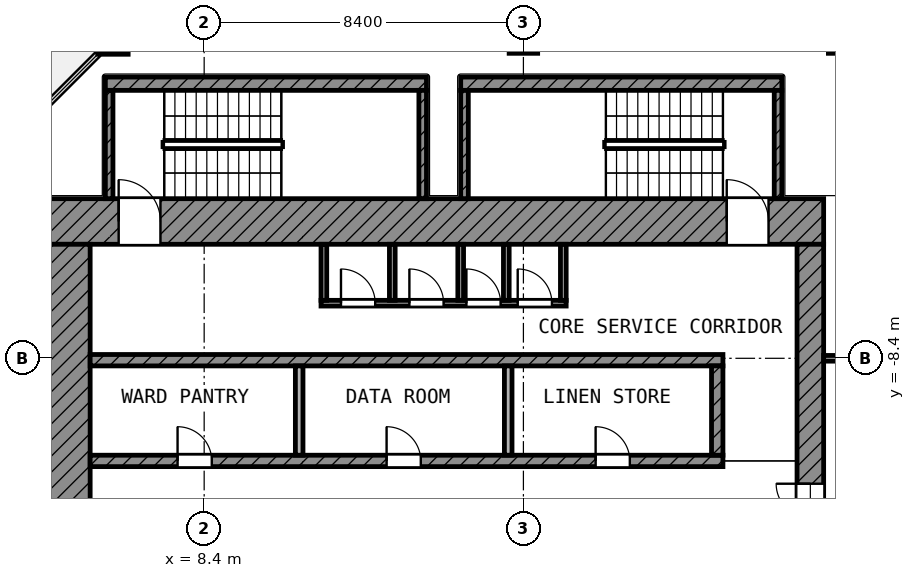
"""IFC4 building model, lengths in metres.
Left out: names, types, materials, properties, quantities, classifications, styles, units other than length and angle.
Written with IfcOpenShell. Run it as: python <this file> out.ifc"""

import sys

from ifc_helpers import new_model, si_unit, direction, frame, frame_2d, origin, origin_2d, place, context, subcontext, project, spatial, rectangle, extrude, element, fill, save


model = new_model("IFC4")
c1 = context("Model", 3, precision=1e-05, world=origin(), true_north=direction((0.0, 1.0)))
c2 = subcontext(c1, "Body", "Model", "MODEL_VIEW")
j1 = project(units=[si_unit("LENGTHUNIT", "METRE"), si_unit("PLANEANGLEUNIT", "RADIAN")], contexts=[c1])
p1 = place(None, origin())
s1 = spatial("IfcSite", under=j1, at=p1, CompositionType="ELEMENT")
p2 = place(p1, origin())
s2 = spatial("IfcBuilding", under=s1, at=p2, CompositionType="ELEMENT")
p3 = place(p2, frame((0.0, 0.0, 328.0)))
s3 = spatial("IfcBuildingStorey", under=s2, at=p3, CompositionType="ELEMENT", Elevation=328.0)
p4 = place(p3, frame((6.0, 0.0, 0.0), z_axis=(0.0, 0.0, 1.0), x_axis=(1.0, 0.0, 0.0)))
e1 = element("IfcColumn", 1, at=p4, inside=s3, PredefinedType="COLUMN", context=c2, shape_type="SweptSolid", body=[
    extrude(rectangle(XDim=0.8, YDim=0.8, at=origin_2d()), origin(), (0.0, 0.0, 1.0), 4.2),
])
for number, where, z_axis, x_axis in (
    (2, (16.8, 0.0, 0.0), (0.0, 0.0, 1.0), (1.0, 0.0, 0.0)),
    (3, (25.2, 0.0, 0.0), (0.0, 0.0, 1.0), (1.0, 0.0, 0.0)),
):
    element("IfcColumn", number, at=place(p3, frame(where, z_axis=z_axis, x_axis=x_axis)), inside=s3, PredefinedType="COLUMN", context=c2, shape_type="SweptSolid", body=[
        extrude(rectangle(XDim=0.75, YDim=0.75, at=origin_2d()), origin(), (0.0, 0.0, 1.0), 4.2),
    ])
p5 = place(p3, frame((4.2, -4.8, 0.0), z_axis=(0.0, 0.0, 1.0), x_axis=(1.0, 0.0, 0.0)))
e4 = element("IfcWall", 4, at=p5, inside=s3, PredefinedType="SHEAR", context=c2, shape_type="SweptSolid", body=[
    extrude(rectangle(XDim=20.5, YDim=1.2, at=frame_2d((10.25, 0.0))), origin(), (0.0, 0.0, 1.0), 3.78),
])
p6 = place(p5, frame((1.95, 0.0, 0.0)))
e5 = element("IfcOpeningElement", 5, at=p6, cuts=e4, PredefinedType="OPENING", context=c2, shape_type="SweptSolid", body=[
    extrude(rectangle(XDim=1.1, YDim=2.1, at=frame_2d((0.55, 1.05))), frame((0.0, 0.61, 0.0), z_axis=(0.0, -1.0, 0.0), x_axis=(1.0, 0.0, 0.0)), (0.0, 0.0, 1.0), 1.22),
])
p7 = place(p5, frame((17.95, 0.0, 0.0)))
e6 = element("IfcOpeningElement", 6, at=p7, cuts=e4, PredefinedType="OPENING", context=c2, shape_type="SweptSolid", body=[
    extrude(rectangle(XDim=1.1, YDim=2.1, at=frame_2d((0.55, 1.05))), frame((0.0, 0.61, 0.0), z_axis=(0.0, -1.0, 0.0), x_axis=(1.0, 0.0, 0.0)), (0.0, 0.0, 1.0), 1.22),
])
p8 = place(p3, frame((4.8, -24.7, 0.0), z_axis=(0.0, 0.0, 1.0), x_axis=(0.0, 1.0, 0.0)))
e7 = element("IfcWall", 7, at=p8, inside=s3, PredefinedType="SHEAR", context=c2, shape_type="SweptSolid", body=[
    extrude(rectangle(XDim=19.3, YDim=1.2, at=frame_2d((9.65, 0.0))), origin(), (0.0, 0.0, 1.0), 3.78),
])
p9 = place(p8, frame((11.15, 0.0, 0.0)))
e8 = element("IfcOpeningElement", 8, at=p9, cuts=e7, PredefinedType="OPENING", context=c2, shape_type="SweptSolid", body=[
    extrude(rectangle(XDim=1.1, YDim=2.1, at=frame_2d((0.55, 1.05))), frame((0.0, 0.61, 0.0), z_axis=(0.0, -1.0, 0.0), x_axis=(1.0, 0.0, 0.0)), (0.0, 0.0, 1.0), 1.22),
])
p10 = place(p8, frame((1.85, 0.0, 0.0)))
e9 = element("IfcOpeningElement", 9, at=p10, cuts=e7, PredefinedType="OPENING", context=c2, shape_type="SweptSolid", body=[
    extrude(rectangle(XDim=1.1, YDim=2.1, at=frame_2d((0.55, 1.05))), frame((0.0, 0.61, 0.0), z_axis=(0.0, -1.0, 0.0), x_axis=(1.0, 0.0, 0.0)), (0.0, 0.0, 1.0), 1.22),
])
p11 = place(p3, frame((24.35, -24.0, 0.0), z_axis=(0.0, 0.0, 1.0), x_axis=(0.0, 1.0, 0.0)))
e10 = element("IfcWall", 10, at=p11, inside=s3, PredefinedType="SHEAR", context=c2, shape_type="SweptSolid", body=[
    extrude(rectangle(XDim=18.6, YDim=0.7, at=frame_2d((9.3, 0.0))), origin(), (0.0, 0.0, 1.0), 3.78),
])
p12 = place(p11, frame((10.5, 0.0, 0.0)))
e11 = element("IfcOpeningElement", 11, at=p12, cuts=e10, PredefinedType="OPENING", context=c2, shape_type="SweptSolid", body=[
    extrude(rectangle(XDim=1.8, YDim=2.1, at=frame_2d((0.9, 1.05))), frame((0.0, 0.36, 0.0), z_axis=(0.0, -1.0, 0.0), x_axis=(1.0, 0.0, 0.0)), (0.0, 0.0, 1.0), 0.72),
])
p13 = place(p3, frame((5.4, -8.45, 0.0), z_axis=(0.0, 0.0, 1.0), x_axis=(1.0, 0.0, 0.0)))
e12 = element("IfcWall", 12, at=p13, inside=s3, PredefinedType="SHEAR", context=c2, shape_type="SweptSolid", body=[
    extrude(rectangle(XDim=16.65, YDim=0.3, at=frame_2d((8.325, 0.0))), origin(), (0.0, 0.0, 1.0), 3.78),
])
p14 = place(p3, frame((5.4, -11.1, 0.0), z_axis=(0.0, 0.0, 1.0), x_axis=(1.0, 0.0, 0.0)))
e13 = element("IfcWall", 13, at=p14, inside=s3, PredefinedType="SHEAR", context=c2, shape_type="SweptSolid", body=[
    extrude(rectangle(XDim=16.65, YDim=0.3, at=frame_2d((8.325, 0.0))), origin(), (0.0, 0.0, 1.0), 3.78),
])
p15 = place(p14, frame((2.3, 0.0, 0.0)))
e14 = element("IfcOpeningElement", 14, at=p15, cuts=e13, PredefinedType="OPENING", context=c2, shape_type="SweptSolid", body=[
    extrude(rectangle(XDim=0.9, YDim=2.1, at=frame_2d((0.45, 1.05))), frame((0.0, 0.16, 0.0), z_axis=(0.0, -1.0, 0.0), x_axis=(1.0, 0.0, 0.0)), (0.0, 0.0, 1.0), 0.32),
])
p16 = place(p14, frame((7.8, 0.0, 0.0)))
e15 = element("IfcOpeningElement", 15, at=p16, cuts=e13, PredefinedType="OPENING", context=c2, shape_type="SweptSolid", body=[
    extrude(rectangle(XDim=0.9, YDim=2.1, at=frame_2d((0.45, 1.05))), frame((0.0, 0.16, 0.0), z_axis=(0.0, -1.0, 0.0), x_axis=(1.0, 0.0, 0.0)), (0.0, 0.0, 1.0), 0.32),
])
p17 = place(p14, frame((13.3, 0.0, 0.0)))
e16 = element("IfcOpeningElement", 16, at=p17, cuts=e13, PredefinedType="OPENING", context=c2, shape_type="SweptSolid", body=[
    extrude(rectangle(XDim=0.9, YDim=2.1, at=frame_2d((0.45, 1.05))), frame((0.0, 0.16, 0.0), z_axis=(0.0, -1.0, 0.0), x_axis=(1.0, 0.0, 0.0)), (0.0, 0.0, 1.0), 0.32),
])
p18 = place(p3, frame((21.9, -10.95, 0.0), z_axis=(0.0, 0.0, 1.0), x_axis=(0.0, 1.0, 0.0)))
e17 = element("IfcWall", 17, at=p18, inside=s3, PredefinedType="SHEAR", context=c2, shape_type="SweptSolid", body=[
    extrude(rectangle(XDim=2.35, YDim=0.3, at=frame_2d((1.175, 0.0))), origin(), (0.0, 0.0, 1.0), 3.78),
])
for number, where, z_axis, x_axis in (
    (18, (10.9, -10.95, 0.0), (0.0, 0.0, 1.0), (0.0, 1.0, 0.0)),
    (19, (16.4, -10.95, 0.0), (0.0, 0.0, 1.0), (0.0, 1.0, 0.0)),
):
    element("IfcWall", number, at=place(p3, frame(where, z_axis=z_axis, x_axis=x_axis)), inside=s3, PredefinedType="PARTITIONING", context=c2, shape_type="SweptSolid", body=[
        extrude(rectangle(XDim=2.35, YDim=0.2, at=frame_2d((1.175, 0.0))), origin(), (0.0, 0.0, 1.0), 3.78),
    ])
p19 = place(p3, frame((11.475, -6.95, 0.0), z_axis=(0.0, 0.0, 1.0), x_axis=(1.0, 0.0, 0.0)))
e20 = element("IfcWall", 20, at=p19, inside=s3, PredefinedType="PARTITIONING", context=c2, shape_type="SweptSolid", body=[
    extrude(rectangle(XDim=6.45, YDim=0.15, at=frame_2d((3.225, 0.0))), origin(), (0.0, 0.0, 1.0), 3.78),
])
p20 = place(p19, frame((0.525, 0.0, 0.0)))
e21 = element("IfcOpeningElement", 21, at=p20, cuts=e20, PredefinedType="OPENING", context=c2, shape_type="SweptSolid", body=[
    extrude(rectangle(XDim=0.9, YDim=2.1, at=frame_2d((0.45, 1.05))), frame((0.0, 0.085, 0.0), z_axis=(0.0, -1.0, 0.0), x_axis=(1.0, 0.0, 0.0)), (0.0, 0.0, 1.0), 0.17),
])
p21 = place(p19, frame((2.325, 0.0, 0.0)))
e22 = element("IfcOpeningElement", 22, at=p21, cuts=e20, PredefinedType="OPENING", context=c2, shape_type="SweptSolid", body=[
    extrude(rectangle(XDim=0.9, YDim=2.1, at=frame_2d((0.45, 1.05))), frame((0.0, 0.085, 0.0), z_axis=(0.0, -1.0, 0.0), x_axis=(1.0, 0.0, 0.0)), (0.0, 0.0, 1.0), 0.17),
])
p22 = place(p19, frame((3.825, 0.0, 0.0)))
e23 = element("IfcOpeningElement", 23, at=p22, cuts=e20, PredefinedType="OPENING", context=c2, shape_type="SweptSolid", body=[
    extrude(rectangle(XDim=0.9, YDim=2.1, at=frame_2d((0.45, 1.05))), frame((0.0, 0.085, 0.0), z_axis=(0.0, -1.0, 0.0), x_axis=(1.0, 0.0, 0.0)), (0.0, 0.0, 1.0), 0.17),
])
p23 = place(p19, frame((5.175, 0.0, 0.0)))
e24 = element("IfcOpeningElement", 24, at=p23, cuts=e20, PredefinedType="OPENING", context=c2, shape_type="SweptSolid", body=[
    extrude(rectangle(XDim=0.9, YDim=2.1, at=frame_2d((0.45, 1.05))), frame((0.0, 0.085, 0.0), z_axis=(0.0, -1.0, 0.0), x_axis=(1.0, 0.0, 0.0)), (0.0, 0.0, 1.0), 0.17),
])
for number, where, z_axis, x_axis in (
    (25, (11.55, -6.875, 0.0), (0.0, 0.0, 1.0), (0.0, 1.0, 0.0)),
    (26, (13.35, -6.875, 0.0), (0.0, 0.0, 1.0), (0.0, 1.0, 0.0)),
    (27, (15.15, -6.875, 0.0), (0.0, 0.0, 1.0), (0.0, 1.0, 0.0)),
    (28, (16.35, -6.875, 0.0), (0.0, 0.0, 1.0), (0.0, 1.0, 0.0)),
    (29, (17.85, -6.875, 0.0), (0.0, 0.0, 1.0), (0.0, 1.0, 0.0)),
):
    element("IfcWall", number, at=place(p3, frame(where, z_axis=z_axis, x_axis=x_axis)), inside=s3, PredefinedType="PARTITIONING", context=c2, shape_type="SweptSolid", body=[
        extrude(rectangle(XDim=1.475, YDim=0.15, at=frame_2d((0.738, 0.0))), origin(), (0.0, 0.0, 1.0), 3.78),
    ])
p24 = place(p3, frame((5.8, -1.175, 0.0), z_axis=(0.0, 0.0, 1.0), x_axis=(1.0, 0.0, 0.0)))
e30 = element("IfcWall", 30, at=p24, inside=s3, PredefinedType="SHEAR", context=c2, shape_type="SweptSolid", body=[
    extrude(rectangle(XDim=8.45, YDim=0.35, at=frame_2d((4.225, 0.0))), origin(), (0.0, 0.0, 1.0), 3.78),
])
for number, where, z_axis, x_axis in (
    (31, (5.9, -4.2, 0.0), (0.0, 0.0, 1.0), (0.0, 1.0, 0.0)),
    (32, (14.15, -4.2, 0.0), (0.0, 0.0, 1.0), (0.0, 1.0, 0.0)),
):
    element("IfcWall", number, at=place(p3, frame(where, z_axis=z_axis, x_axis=x_axis)), inside=s3, PredefinedType="SHEAR", context=c2, shape_type="SweptSolid", body=[
        extrude(rectangle(XDim=2.85, YDim=0.2, at=frame_2d((1.425, 0.0))), origin(), (0.0, 0.0, 1.0), 3.78),
    ])
p25 = place(p3, frame((15.15, -1.175, 0.0), z_axis=(0.0, 0.0, 1.0), x_axis=(1.0, 0.0, 0.0)))
e33 = element("IfcWall", 33, at=p25, inside=s3, PredefinedType="SHEAR", context=c2, shape_type="SweptSolid", body=[
    extrude(rectangle(XDim=8.45, YDim=0.35, at=frame_2d((4.225, 0.0))), origin(), (0.0, 0.0, 1.0), 3.78),
])
for number, where, z_axis, x_axis in (
    (34, (15.25, -4.2, 0.0), (0.0, 0.0, 1.0), (0.0, 1.0, 0.0)),
    (35, (23.5, -4.2, 0.0), (0.0, 0.0, 1.0), (0.0, 1.0, 0.0)),
):
    element("IfcWall", number, at=place(p3, frame(where, z_axis=z_axis, x_axis=x_axis)), inside=s3, PredefinedType="SHEAR", context=c2, shape_type="SweptSolid", body=[
        extrude(rectangle(XDim=2.85, YDim=0.2, at=frame_2d((1.425, 0.0))), origin(), (0.0, 0.0, 1.0), 3.78),
    ])
p26 = place(p3, frame((24.7, -8.4, 0.0), z_axis=(0.0, 0.0, 1.0), x_axis=(1.0, 0.0, 0.0)))
e36 = element("IfcWall", 36, at=p26, inside=s3, PredefinedType="PARTITIONING", context=c2, shape_type="SweptSolid", body=[
    extrude(rectangle(XDim=15.582, YDim=0.15, at=frame_2d((7.791, 0.0))), origin(), (0.0, 0.0, 1.0), 3.78),
])
p27 = place(p26, frame((1.85, 0.0, 0.0)))
e37 = element("IfcOpeningElement", 37, at=p27, cuts=e36, PredefinedType="OPENING", context=c2, shape_type="SweptSolid", body=[
    extrude(rectangle(XDim=1.2, YDim=2.1, at=frame_2d((0.6, 1.05))), frame((0.0, 0.085, 0.0), z_axis=(0.0, -1.0, 0.0), x_axis=(1.0, 0.0, 0.0)), (0.0, 0.0, 1.0), 0.17),
])
p28 = place(p26, frame((6.7, 0.0, 0.0)))
e38 = element("IfcOpeningElement", 38, at=p28, cuts=e36, PredefinedType="OPENING", context=c2, shape_type="SweptSolid", body=[
    extrude(rectangle(XDim=1.2, YDim=2.1, at=frame_2d((0.6, 1.05))), frame((0.0, 0.085, 0.0), z_axis=(0.0, -1.0, 0.0), x_axis=(1.0, 0.0, 0.0)), (0.0, 0.0, 1.0), 0.17),
])
p29 = place(p26, frame((9.4, 0.0, 0.0)))
e39 = element("IfcOpeningElement", 39, at=p29, cuts=e36, PredefinedType="OPENING", context=c2, shape_type="SweptSolid", body=[
    extrude(rectangle(XDim=1.2, YDim=2.1, at=frame_2d((0.6, 1.05))), frame((0.0, 0.085, 0.0), z_axis=(0.0, -1.0, 0.0), x_axis=(1.0, 0.0, 0.0)), (0.0, 0.0, 1.0), 0.17),
])
p30 = place(p6, origin())
e40 = element("IfcDoor", 40, at=p30, inside=s3, OperationType="SINGLE_SWING_LEFT", PredefinedType="DOOR", context=c2, shape_type="SweptSolid", body=[
    extrude(rectangle(XDim=1.1, YDim=2.1, at=frame_2d((0.55, 1.05))), frame((0.0, 0.025, 0.0), z_axis=(0.0, -1.0, 0.0), x_axis=(1.0, 0.0, 0.0)), (0.0, 0.0, 1.0), 0.05),
])
fill(e5, e40)
p31 = place(p7, origin())
e41 = element("IfcDoor", 41, at=p31, inside=s3, OperationType="SINGLE_SWING_LEFT", PredefinedType="DOOR", context=c2, shape_type="SweptSolid", body=[
    extrude(rectangle(XDim=1.1, YDim=2.1, at=frame_2d((0.55, 1.05))), frame((0.0, 0.025, 0.0), z_axis=(0.0, -1.0, 0.0), x_axis=(1.0, 0.0, 0.0)), (0.0, 0.0, 1.0), 0.05),
])
fill(e6, e41)
p32 = place(p12, origin())
e42 = element("IfcDoor", 42, at=p32, inside=s3, OperationType="DOUBLE_DOOR_SINGLE_SWING", PredefinedType="DOOR", context=c2, shape_type="SweptSolid", body=[
    extrude(rectangle(XDim=1.8, YDim=2.1, at=frame_2d((0.9, 1.05))), frame((0.0, 0.025, 0.0), z_axis=(0.0, -1.0, 0.0), x_axis=(1.0, 0.0, 0.0)), (0.0, 0.0, 1.0), 0.05),
])
fill(e11, e42)
p33 = place(p20, origin())
e43 = element("IfcDoor", 43, at=p33, inside=s3, OperationType="SINGLE_SWING_LEFT", PredefinedType="DOOR", context=c2, shape_type="SweptSolid", body=[
    extrude(rectangle(XDim=0.9, YDim=2.1, at=frame_2d((0.45, 1.05))), frame((0.0, 0.025, 0.0), z_axis=(0.0, -1.0, 0.0), x_axis=(1.0, 0.0, 0.0)), (0.0, 0.0, 1.0), 0.05),
])
fill(e21, e43)
p34 = place(p21, origin())
e44 = element("IfcDoor", 44, at=p34, inside=s3, OperationType="SINGLE_SWING_LEFT", PredefinedType="DOOR", context=c2, shape_type="SweptSolid", body=[
    extrude(rectangle(XDim=0.9, YDim=2.1, at=frame_2d((0.45, 1.05))), frame((0.0, 0.025, 0.0), z_axis=(0.0, -1.0, 0.0), x_axis=(1.0, 0.0, 0.0)), (0.0, 0.0, 1.0), 0.05),
])
fill(e22, e44)
p35 = place(p22, origin())
e45 = element("IfcDoor", 45, at=p35, inside=s3, OperationType="SINGLE_SWING_LEFT", PredefinedType="DOOR", context=c2, shape_type="SweptSolid", body=[
    extrude(rectangle(XDim=0.9, YDim=2.1, at=frame_2d((0.45, 1.05))), frame((0.0, 0.025, 0.0), z_axis=(0.0, -1.0, 0.0), x_axis=(1.0, 0.0, 0.0)), (0.0, 0.0, 1.0), 0.05),
])
fill(e23, e45)
p36 = place(p23, origin())
e46 = element("IfcDoor", 46, at=p36, inside=s3, OperationType="SINGLE_SWING_LEFT", PredefinedType="DOOR", context=c2, shape_type="SweptSolid", body=[
    extrude(rectangle(XDim=0.9, YDim=2.1, at=frame_2d((0.45, 1.05))), frame((0.0, 0.025, 0.0), z_axis=(0.0, -1.0, 0.0), x_axis=(1.0, 0.0, 0.0)), (0.0, 0.0, 1.0), 0.05),
])
fill(e24, e46)
p37 = place(p15, origin())
e47 = element("IfcDoor", 47, at=p37, inside=s3, OperationType="SINGLE_SWING_LEFT", PredefinedType="DOOR", context=c2, shape_type="SweptSolid", body=[
    extrude(rectangle(XDim=0.9, YDim=2.1, at=frame_2d((0.45, 1.05))), frame((0.0, 0.025, 0.0), z_axis=(0.0, -1.0, 0.0), x_axis=(1.0, 0.0, 0.0)), (0.0, 0.0, 1.0), 0.05),
])
fill(e14, e47)
p38 = place(p16, origin())
e48 = element("IfcDoor", 48, at=p38, inside=s3, OperationType="SINGLE_SWING_LEFT", PredefinedType="DOOR", context=c2, shape_type="SweptSolid", body=[
    extrude(rectangle(XDim=0.9, YDim=2.1, at=frame_2d((0.45, 1.05))), frame((0.0, 0.025, 0.0), z_axis=(0.0, -1.0, 0.0), x_axis=(1.0, 0.0, 0.0)), (0.0, 0.0, 1.0), 0.05),
])
fill(e15, e48)
p39 = place(p17, origin())
e49 = element("IfcDoor", 49, at=p39, inside=s3, OperationType="SINGLE_SWING_LEFT", PredefinedType="DOOR", context=c2, shape_type="SweptSolid", body=[
    extrude(rectangle(XDim=0.9, YDim=2.1, at=frame_2d((0.45, 1.05))), frame((0.0, 0.025, 0.0), z_axis=(0.0, -1.0, 0.0), x_axis=(1.0, 0.0, 0.0)), (0.0, 0.0, 1.0), 0.05),
])
fill(e16, e49)
save(model, sys.argv[1])
